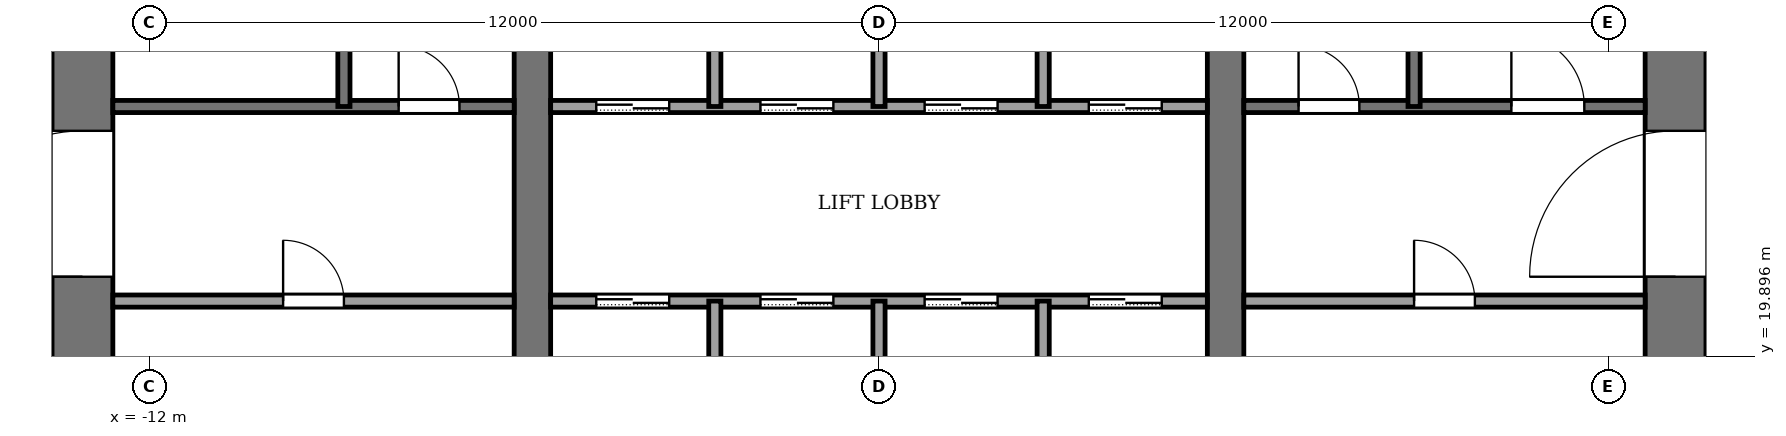
"""IFC4 building model, lengths in metres.
Left out: names, types, materials, properties, quantities, classifications, styles, units other than length and angle.
Written with IfcOpenShell. Run it as: python <this file> out.ifc"""

import sys

from ifc_helpers import new_model, si_unit, direction, frame, frame_2d, origin, place, context, subcontext, project, spatial, rectangle, extrude, element, fill, save


model = new_model("IFC4")
c1 = context("Model", 3, precision=1e-05, world=origin(), true_north=direction((0.0, 1.0)))
c2 = subcontext(c1, "Body", "Model", "MODEL_VIEW")
j1 = project(units=[si_unit("LENGTHUNIT", "METRE"), si_unit("PLANEANGLEUNIT", "RADIAN")], contexts=[c1])
p1 = place(None, origin())
s1 = spatial("IfcSite", under=j1, at=p1, CompositionType="ELEMENT")
p2 = place(p1, origin())
s2 = spatial("IfcBuilding", under=s1, at=p2, CompositionType="ELEMENT")
p3 = place(p2, frame((0.0, 0.0, 158.0)))
s3 = spatial("IfcBuildingStorey", under=s2, at=p3, CompositionType="ELEMENT", Elevation=158.0)
p4 = place(p3, frame((-13.1, 18.4, -0.13), z_axis=(0.0, 0.0, 1.0), x_axis=(0.0, 1.0, 0.0)))
e1 = element("IfcWall", 1, at=p4, inside=s3, PredefinedType="SHEAR", context=c2, shape_type="SweptSolid", body=[
    extrude(rectangle(XDim=19.2, YDim=1.0, at=frame_2d((9.6, 0.0))), origin(), (0.0, 0.0, 1.0), 4.0),
])
p5 = place(p4, frame((2.8, 0.0, 0.13)))
e2 = element("IfcOpeningElement", 2, at=p5, cuts=e1, PredefinedType="OPENING", context=c2, shape_type="SweptSolid", body=[
    extrude(rectangle(XDim=2.4, YDim=2.4, at=frame_2d((1.2, 1.2))), frame((0.0, 0.51, 0.0), z_axis=(0.0, -1.0, 0.0), x_axis=(1.0, 0.0, 0.0)), (0.0, 0.0, 1.0), 1.02),
])
p6 = place(p4, frame((13.4, 0.0, 0.13)))
e3 = element("IfcOpeningElement", 3, at=p6, cuts=e1, PredefinedType="OPENING", context=c2, shape_type="SweptSolid", body=[
    extrude(rectangle(XDim=1.4, YDim=2.2, at=frame_2d((0.7, 1.1))), frame((0.0, 0.51, 0.0), z_axis=(0.0, -1.0, 0.0), x_axis=(1.0, 0.0, 0.0)), (0.0, 0.0, 1.0), 1.02),
])
p7 = place(p3, frame((13.1, 18.4, -0.13), z_axis=(0.0, 0.0, 1.0), x_axis=(0.0, 1.0, 0.0)))
e4 = element("IfcWall", 4, at=p7, inside=s3, PredefinedType="SHEAR", context=c2, shape_type="SweptSolid", body=[
    extrude(rectangle(XDim=19.2, YDim=1.0, at=frame_2d((9.6, 0.0))), origin(), (0.0, 0.0, 1.0), 4.0),
])
p8 = place(p7, frame((2.8, 0.0, 0.13)))
e5 = element("IfcOpeningElement", 5, at=p8, cuts=e4, PredefinedType="OPENING", context=c2, shape_type="SweptSolid", body=[
    extrude(rectangle(XDim=2.4, YDim=2.4, at=frame_2d((1.2, 1.2))), frame((0.0, 0.51, 0.0), z_axis=(0.0, -1.0, 0.0), x_axis=(1.0, 0.0, 0.0)), (0.0, 0.0, 1.0), 1.02),
])
p9 = place(p7, frame((13.3, 0.0, 0.13)))
e6 = element("IfcOpeningElement", 6, at=p9, cuts=e4, PredefinedType="OPENING", context=c2, shape_type="SweptSolid", body=[
    extrude(rectangle(XDim=2.4, YDim=2.4, at=frame_2d((1.2, 1.2))), frame((0.0, 0.51, 0.0), z_axis=(0.0, -1.0, 0.0), x_axis=(1.0, 0.0, 0.0)), (0.0, 0.0, 1.0), 1.02),
])
p10 = place(p3, frame((-5.7, 18.4, -0.13), z_axis=(0.0, 0.0, 1.0), x_axis=(0.0, 1.0, 0.0)))
e7 = element("IfcWall", 7, at=p10, inside=s3, PredefinedType="SHEAR", context=c2, shape_type="SweptSolid", body=[
    extrude(rectangle(XDim=19.2, YDim=0.6, at=frame_2d((9.6, 0.0))), origin(), (0.0, 0.0, 1.0), 4.0),
])
p11 = place(p10, frame((8.35, 0.0, 0.13)))
e8 = element("IfcOpeningElement", 8, at=p11, cuts=e7, PredefinedType="OPENING", context=c2, shape_type="SweptSolid", body=[
    extrude(rectangle(XDim=0.9, YDim=2.1, at=frame_2d((0.45, 1.05))), frame((0.0, 0.31, 0.0), z_axis=(0.0, -1.0, 0.0), x_axis=(1.0, 0.0, 0.0)), (0.0, 0.0, 1.0), 0.62),
])
p12 = place(p3, frame((5.7, 18.4, -0.13), z_axis=(0.0, 0.0, 1.0), x_axis=(0.0, 1.0, 0.0)))
e9 = element("IfcWall", 9, at=p12, inside=s3, PredefinedType="SHEAR", context=c2, shape_type="SweptSolid", body=[
    extrude(rectangle(XDim=19.2, YDim=0.6, at=frame_2d((9.6, 0.0))), origin(), (0.0, 0.0, 1.0), 4.0),
])
p13 = place(p12, frame((13.3, 0.0, 0.13)))
e10 = element("IfcOpeningElement", 10, at=p13, cuts=e9, PredefinedType="OPENING", context=c2, shape_type="SweptSolid", body=[
    extrude(rectangle(XDim=2.4, YDim=2.4, at=frame_2d((1.2, 1.2))), frame((0.0, 0.31, 0.0), z_axis=(0.0, -1.0, 0.0), x_axis=(1.0, 0.0, 0.0)), (0.0, 0.0, 1.0), 0.62),
])
p14 = place(p3, frame((-12.6, 20.8, 0.0), z_axis=(0.0, 0.0, 1.0), x_axis=(1.0, 0.0, 0.0)))
e11 = element("IfcWall", 11, at=p14, inside=s3, PredefinedType="PARTITIONING", context=c2, shape_type="SweptSolid", body=[
    extrude(rectangle(XDim=6.6, YDim=0.2, at=frame_2d((3.3, 0.0))), origin(), (0.0, 0.0, 1.0), 3.87),
])
p15 = place(p14, frame((2.8, 0.0, 0.0)))
e12 = element("IfcOpeningElement", 12, at=p15, cuts=e11, PredefinedType="OPENING", context=c2, shape_type="SweptSolid", body=[
    extrude(rectangle(XDim=1.0, YDim=2.1, at=frame_2d((0.5, 1.05))), frame((0.0, 0.11, 0.0), z_axis=(0.0, -1.0, 0.0), x_axis=(1.0, 0.0, 0.0)), (0.0, 0.0, 1.0), 0.22),
])
p16 = place(p3, frame((-5.4, 20.8, 0.0), z_axis=(0.0, 0.0, 1.0), x_axis=(1.0, 0.0, 0.0)))
e13 = element("IfcWall", 13, at=p16, inside=s3, PredefinedType="PARTITIONING", context=c2, shape_type="SweptSolid", body=[
    extrude(rectangle(XDim=10.8, YDim=0.2, at=frame_2d((5.4, 0.0))), origin(), (0.0, 0.0, 1.0), 3.87),
])
p17 = place(p16, frame((0.75, 0.0, 0.0)))
e14 = element("IfcOpeningElement", 14, at=p17, cuts=e13, PredefinedType="OPENING", context=c2, shape_type="SweptSolid", body=[
    extrude(rectangle(XDim=1.2, YDim=2.2, at=frame_2d((0.6, 1.1))), frame((0.0, 0.11, 0.0), z_axis=(0.0, -1.0, 0.0), x_axis=(1.0, 0.0, 0.0)), (0.0, 0.0, 1.0), 0.22),
])
p18 = place(p16, frame((3.45, 0.0, 0.0)))
e15 = element("IfcOpeningElement", 15, at=p18, cuts=e13, PredefinedType="OPENING", context=c2, shape_type="SweptSolid", body=[
    extrude(rectangle(XDim=1.2, YDim=2.2, at=frame_2d((0.6, 1.1))), frame((0.0, 0.11, 0.0), z_axis=(0.0, -1.0, 0.0), x_axis=(1.0, 0.0, 0.0)), (0.0, 0.0, 1.0), 0.22),
])
p19 = place(p16, frame((6.15, 0.0, 0.0)))
e16 = element("IfcOpeningElement", 16, at=p19, cuts=e13, PredefinedType="OPENING", context=c2, shape_type="SweptSolid", body=[
    extrude(rectangle(XDim=1.2, YDim=2.2, at=frame_2d((0.6, 1.1))), frame((0.0, 0.11, 0.0), z_axis=(0.0, -1.0, 0.0), x_axis=(1.0, 0.0, 0.0)), (0.0, 0.0, 1.0), 0.22),
])
p20 = place(p16, frame((8.85, 0.0, 0.0)))
e17 = element("IfcOpeningElement", 17, at=p20, cuts=e13, PredefinedType="OPENING", context=c2, shape_type="SweptSolid", body=[
    extrude(rectangle(XDim=1.2, YDim=2.2, at=frame_2d((0.6, 1.1))), frame((0.0, 0.11, 0.0), z_axis=(0.0, -1.0, 0.0), x_axis=(1.0, 0.0, 0.0)), (0.0, 0.0, 1.0), 0.22),
])
p21 = place(p3, frame((6.0, 20.8, 0.0), z_axis=(0.0, 0.0, 1.0), x_axis=(1.0, 0.0, 0.0)))
e18 = element("IfcWall", 18, at=p21, inside=s3, PredefinedType="PARTITIONING", context=c2, shape_type="SweptSolid", body=[
    extrude(rectangle(XDim=6.6, YDim=0.2, at=frame_2d((3.3, 0.0))), origin(), (0.0, 0.0, 1.0), 3.87),
])
p22 = place(p21, frame((2.8, 0.0, 0.0)))
e19 = element("IfcOpeningElement", 19, at=p22, cuts=e18, PredefinedType="OPENING", context=c2, shape_type="SweptSolid", body=[
    extrude(rectangle(XDim=1.0, YDim=2.1, at=frame_2d((0.5, 1.05))), frame((0.0, 0.11, 0.0), z_axis=(0.0, -1.0, 0.0), x_axis=(1.0, 0.0, 0.0)), (0.0, 0.0, 1.0), 0.22),
])
p23 = place(p3, frame((-12.6, 24.0, 0.0), z_axis=(0.0, 0.0, 1.0), x_axis=(1.0, 0.0, 0.0)))
e20 = element("IfcWall", 20, at=p23, inside=s3, PredefinedType="PARTITIONING", context=c2, shape_type="SweptSolid", body=[
    extrude(rectangle(XDim=6.6, YDim=0.2, at=frame_2d((3.3, 0.0))), origin(), (0.0, 0.0, 1.0), 3.87),
])
p24 = place(p23, frame((4.7, 0.0, 0.0)))
e21 = element("IfcOpeningElement", 21, at=p24, cuts=e20, PredefinedType="OPENING", context=c2, shape_type="SweptSolid", body=[
    extrude(rectangle(XDim=1.0, YDim=2.1, at=frame_2d((0.5, 1.05))), frame((0.0, 0.11, 0.0), z_axis=(0.0, -1.0, 0.0), x_axis=(1.0, 0.0, 0.0)), (0.0, 0.0, 1.0), 0.22),
])
p25 = place(p3, frame((-5.4, 24.0, 0.0), z_axis=(0.0, 0.0, 1.0), x_axis=(1.0, 0.0, 0.0)))
e22 = element("IfcWall", 22, at=p25, inside=s3, PredefinedType="PARTITIONING", context=c2, shape_type="SweptSolid", body=[
    extrude(rectangle(XDim=10.8, YDim=0.2, at=frame_2d((5.4, 0.0))), origin(), (0.0, 0.0, 1.0), 3.87),
])
p26 = place(p25, frame((0.75, 0.0, 0.0)))
e23 = element("IfcOpeningElement", 23, at=p26, cuts=e22, PredefinedType="OPENING", context=c2, shape_type="SweptSolid", body=[
    extrude(rectangle(XDim=1.2, YDim=2.2, at=frame_2d((0.6, 1.1))), frame((0.0, 0.11, 0.0), z_axis=(0.0, -1.0, 0.0), x_axis=(1.0, 0.0, 0.0)), (0.0, 0.0, 1.0), 0.22),
])
p27 = place(p25, frame((3.45, 0.0, 0.0)))
e24 = element("IfcOpeningElement", 24, at=p27, cuts=e22, PredefinedType="OPENING", context=c2, shape_type="SweptSolid", body=[
    extrude(rectangle(XDim=1.2, YDim=2.2, at=frame_2d((0.6, 1.1))), frame((0.0, 0.11, 0.0), z_axis=(0.0, -1.0, 0.0), x_axis=(1.0, 0.0, 0.0)), (0.0, 0.0, 1.0), 0.22),
])
p28 = place(p25, frame((6.15, 0.0, 0.0)))
e25 = element("IfcOpeningElement", 25, at=p28, cuts=e22, PredefinedType="OPENING", context=c2, shape_type="SweptSolid", body=[
    extrude(rectangle(XDim=1.2, YDim=2.2, at=frame_2d((0.6, 1.1))), frame((0.0, 0.11, 0.0), z_axis=(0.0, -1.0, 0.0), x_axis=(1.0, 0.0, 0.0)), (0.0, 0.0, 1.0), 0.22),
])
p29 = place(p25, frame((8.85, 0.0, 0.0)))
e26 = element("IfcOpeningElement", 26, at=p29, cuts=e22, PredefinedType="OPENING", context=c2, shape_type="SweptSolid", body=[
    extrude(rectangle(XDim=1.2, YDim=2.2, at=frame_2d((0.6, 1.1))), frame((0.0, 0.11, 0.0), z_axis=(0.0, -1.0, 0.0), x_axis=(1.0, 0.0, 0.0)), (0.0, 0.0, 1.0), 0.22),
])
p30 = place(p3, frame((6.0, 24.0, 0.0), z_axis=(0.0, 0.0, 1.0), x_axis=(1.0, 0.0, 0.0)))
e27 = element("IfcWall", 27, at=p30, inside=s3, PredefinedType="PARTITIONING", context=c2, shape_type="SweptSolid", body=[
    extrude(rectangle(XDim=6.6, YDim=0.2, at=frame_2d((3.3, 0.0))), origin(), (0.0, 0.0, 1.0), 3.87),
])
p31 = place(p30, frame((0.9, 0.0, 0.0)))
e28 = element("IfcOpeningElement", 28, at=p31, cuts=e27, PredefinedType="OPENING", context=c2, shape_type="SweptSolid", body=[
    extrude(rectangle(XDim=1.0, YDim=2.1, at=frame_2d((0.5, 1.05))), frame((0.0, 0.11, 0.0), z_axis=(0.0, -1.0, 0.0), x_axis=(1.0, 0.0, 0.0)), (0.0, 0.0, 1.0), 0.22),
])
p32 = place(p30, frame((4.4, 0.0, 0.0)))
e29 = element("IfcOpeningElement", 29, at=p32, cuts=e27, PredefinedType="OPENING", context=c2, shape_type="SweptSolid", body=[
    extrude(rectangle(XDim=1.2, YDim=2.2, at=frame_2d((0.6, 1.1))), frame((0.0, 0.11, 0.0), z_axis=(0.0, -1.0, 0.0), x_axis=(1.0, 0.0, 0.0)), (0.0, 0.0, 1.0), 0.22),
])
p33 = place(p3, frame((-8.8, 24.0, 0.0), z_axis=(0.0, 0.0, 1.0), x_axis=(0.0, 1.0, 0.0)))
e30 = element("IfcWall", 30, at=p33, inside=s3, PredefinedType="PARTITIONING", context=c2, shape_type="SweptSolid", body=[
    extrude(rectangle(XDim=7.4, YDim=0.2, at=frame_2d((3.7, 0.0))), origin(), (0.0, 0.0, 1.0), 3.87),
])
p34 = place(p3, frame((-2.7, 18.4, 0.0), z_axis=(0.0, 0.0, 1.0), x_axis=(0.0, 1.0, 0.0)))
e31 = element("IfcWall", 31, at=p34, inside=s3, PredefinedType="PARTITIONING", context=c2, shape_type="SweptSolid", body=[
    extrude(rectangle(XDim=2.4, YDim=0.2, at=frame_2d((1.2, 0.0))), origin(), (0.0, 0.0, 1.0), 3.87),
])
p35 = place(p3, frame((-2.7, 24.0, 0.0), z_axis=(0.0, 0.0, 1.0), x_axis=(0.0, 1.0, 0.0)))
e32 = element("IfcWall", 32, at=p35, inside=s3, PredefinedType="PARTITIONING", context=c2, shape_type="SweptSolid", body=[
    extrude(rectangle(XDim=2.4, YDim=0.2, at=frame_2d((1.2, 0.0))), origin(), (0.0, 0.0, 1.0), 3.87),
])
p36 = place(p3, frame((0.0, 18.4, 0.0), z_axis=(0.0, 0.0, 1.0), x_axis=(0.0, 1.0, 0.0)))
e33 = element("IfcWall", 33, at=p36, inside=s3, PredefinedType="PARTITIONING", context=c2, shape_type="SweptSolid", body=[
    extrude(rectangle(XDim=2.4, YDim=0.2, at=frame_2d((1.2, 0.0))), origin(), (0.0, 0.0, 1.0), 3.87),
])
p37 = place(p3, frame((0.0, 24.0, 0.0), z_axis=(0.0, 0.0, 1.0), x_axis=(0.0, 1.0, 0.0)))
e34 = element("IfcWall", 34, at=p37, inside=s3, PredefinedType="PARTITIONING", context=c2, shape_type="SweptSolid", body=[
    extrude(rectangle(XDim=2.4, YDim=0.2, at=frame_2d((1.2, 0.0))), origin(), (0.0, 0.0, 1.0), 3.87),
])
p38 = place(p3, frame((2.7, 18.4, 0.0), z_axis=(0.0, 0.0, 1.0), x_axis=(0.0, 1.0, 0.0)))
e35 = element("IfcWall", 35, at=p38, inside=s3, PredefinedType="PARTITIONING", context=c2, shape_type="SweptSolid", body=[
    extrude(rectangle(XDim=2.4, YDim=0.2, at=frame_2d((1.2, 0.0))), origin(), (0.0, 0.0, 1.0), 3.87),
])
p39 = place(p3, frame((2.7, 24.0, 0.0), z_axis=(0.0, 0.0, 1.0), x_axis=(0.0, 1.0, 0.0)))
e36 = element("IfcWall", 36, at=p39, inside=s3, PredefinedType="PARTITIONING", context=c2, shape_type="SweptSolid", body=[
    extrude(rectangle(XDim=2.4, YDim=0.2, at=frame_2d((1.2, 0.0))), origin(), (0.0, 0.0, 1.0), 3.87),
])
p40 = place(p3, frame((8.8, 24.0, 0.0), z_axis=(0.0, 0.0, 1.0), x_axis=(0.0, 1.0, 0.0)))
e37 = element("IfcWall", 37, at=p40, inside=s3, PredefinedType="PARTITIONING", context=c2, shape_type="SweptSolid", body=[
    extrude(rectangle(XDim=7.4, YDim=0.2, at=frame_2d((3.7, 0.0))), origin(), (0.0, 0.0, 1.0), 3.87),
])
p41 = place(p17, origin())
e38 = element("IfcDoor", 38, at=p41, inside=s3, OperationType="SLIDING_TO_LEFT", PredefinedType="DOOR", context=c2, shape_type="SweptSolid", body=[
    extrude(rectangle(XDim=1.2, YDim=2.2, at=frame_2d((0.6, 1.1))), frame((0.0, 0.025, 0.0), z_axis=(0.0, -1.0, 0.0), x_axis=(1.0, 0.0, 0.0)), (0.0, 0.0, 1.0), 0.05),
])
fill(e14, e38)
p42 = place(p18, origin())
e39 = element("IfcDoor", 39, at=p42, inside=s3, OperationType="SLIDING_TO_LEFT", PredefinedType="DOOR", context=c2, shape_type="SweptSolid", body=[
    extrude(rectangle(XDim=1.2, YDim=2.2, at=frame_2d((0.6, 1.1))), frame((0.0, 0.025, 0.0), z_axis=(0.0, -1.0, 0.0), x_axis=(1.0, 0.0, 0.0)), (0.0, 0.0, 1.0), 0.05),
])
fill(e15, e39)
p43 = place(p19, origin())
e40 = element("IfcDoor", 40, at=p43, inside=s3, OperationType="SLIDING_TO_LEFT", PredefinedType="DOOR", context=c2, shape_type="SweptSolid", body=[
    extrude(rectangle(XDim=1.2, YDim=2.2, at=frame_2d((0.6, 1.1))), frame((0.0, 0.025, 0.0), z_axis=(0.0, -1.0, 0.0), x_axis=(1.0, 0.0, 0.0)), (0.0, 0.0, 1.0), 0.05),
])
fill(e16, e40)
p44 = place(p20, origin())
e41 = element("IfcDoor", 41, at=p44, inside=s3, OperationType="SLIDING_TO_LEFT", PredefinedType="DOOR", context=c2, shape_type="SweptSolid", body=[
    extrude(rectangle(XDim=1.2, YDim=2.2, at=frame_2d((0.6, 1.1))), frame((0.0, 0.025, 0.0), z_axis=(0.0, -1.0, 0.0), x_axis=(1.0, 0.0, 0.0)), (0.0, 0.0, 1.0), 0.05),
])
fill(e17, e41)
p45 = place(p26, origin())
e42 = element("IfcDoor", 42, at=p45, inside=s3, OperationType="SLIDING_TO_LEFT", PredefinedType="DOOR", context=c2, shape_type="SweptSolid", body=[
    extrude(rectangle(XDim=1.2, YDim=2.2, at=frame_2d((0.6, 1.1))), frame((0.0, 0.025, 0.0), z_axis=(0.0, -1.0, 0.0), x_axis=(1.0, 0.0, 0.0)), (0.0, 0.0, 1.0), 0.05),
])
fill(e23, e42)
p46 = place(p27, origin())
e43 = element("IfcDoor", 43, at=p46, inside=s3, OperationType="SLIDING_TO_LEFT", PredefinedType="DOOR", context=c2, shape_type="SweptSolid", body=[
    extrude(rectangle(XDim=1.2, YDim=2.2, at=frame_2d((0.6, 1.1))), frame((0.0, 0.025, 0.0), z_axis=(0.0, -1.0, 0.0), x_axis=(1.0, 0.0, 0.0)), (0.0, 0.0, 1.0), 0.05),
])
fill(e24, e43)
p47 = place(p28, origin())
e44 = element("IfcDoor", 44, at=p47, inside=s3, OperationType="SLIDING_TO_LEFT", PredefinedType="DOOR", context=c2, shape_type="SweptSolid", body=[
    extrude(rectangle(XDim=1.2, YDim=2.2, at=frame_2d((0.6, 1.1))), frame((0.0, 0.025, 0.0), z_axis=(0.0, -1.0, 0.0), x_axis=(1.0, 0.0, 0.0)), (0.0, 0.0, 1.0), 0.05),
])
fill(e25, e44)
p48 = place(p29, origin())
e45 = element("IfcDoor", 45, at=p48, inside=s3, OperationType="SLIDING_TO_LEFT", PredefinedType="DOOR", context=c2, shape_type="SweptSolid", body=[
    extrude(rectangle(XDim=1.2, YDim=2.2, at=frame_2d((0.6, 1.1))), frame((0.0, 0.025, 0.0), z_axis=(0.0, -1.0, 0.0), x_axis=(1.0, 0.0, 0.0)), (0.0, 0.0, 1.0), 0.05),
])
fill(e26, e45)
p49 = place(p15, origin())
e46 = element("IfcDoor", 46, at=p49, inside=s3, OperationType="SINGLE_SWING_LEFT", PredefinedType="DOOR", context=c2, shape_type="SweptSolid", body=[
    extrude(rectangle(XDim=1.0, YDim=2.1, at=frame_2d((0.5, 1.05))), frame((0.0, 0.025, 0.0), z_axis=(0.0, -1.0, 0.0), x_axis=(1.0, 0.0, 0.0)), (0.0, 0.0, 1.0), 0.05),
])
fill(e12, e46)
p50 = place(p22, origin())
e47 = element("IfcDoor", 47, at=p50, inside=s3, OperationType="SINGLE_SWING_RIGHT", PredefinedType="DOOR", context=c2, shape_type="SweptSolid", body=[
    extrude(rectangle(XDim=1.0, YDim=2.1, at=frame_2d((0.5, 1.05))), frame((0.0, 0.025, 0.0), z_axis=(0.0, -1.0, 0.0), x_axis=(1.0, 0.0, 0.0)), (0.0, 0.0, 1.0), 0.05),
])
fill(e19, e47)
p51 = place(p24, origin())
e48 = element("IfcDoor", 48, at=p51, inside=s3, OperationType="SINGLE_SWING_RIGHT", PredefinedType="DOOR", context=c2, shape_type="SweptSolid", body=[
    extrude(rectangle(XDim=1.0, YDim=2.1, at=frame_2d((0.5, 1.05))), frame((0.0, 0.025, 0.0), z_axis=(0.0, -1.0, 0.0), x_axis=(1.0, 0.0, 0.0)), (0.0, 0.0, 1.0), 0.05),
])
fill(e21, e48)
p52 = place(p31, origin())
e49 = element("IfcDoor", 49, at=p52, inside=s3, OperationType="SINGLE_SWING_LEFT", PredefinedType="DOOR", context=c2, shape_type="SweptSolid", body=[
    extrude(rectangle(XDim=1.0, YDim=2.1, at=frame_2d((0.5, 1.05))), frame((0.0, 0.025, 0.0), z_axis=(0.0, -1.0, 0.0), x_axis=(1.0, 0.0, 0.0)), (0.0, 0.0, 1.0), 0.05),
])
fill(e28, e49)
p53 = place(p32, origin())
e50 = element("IfcDoor", 50, at=p53, inside=s3, OperationType="SINGLE_SWING_LEFT", PredefinedType="DOOR", context=c2, shape_type="SweptSolid", body=[
    extrude(rectangle(XDim=1.2, YDim=2.2, at=frame_2d((0.6, 1.1))), frame((0.0, 0.025, 0.0), z_axis=(0.0, -1.0, 0.0), x_axis=(1.0, 0.0, 0.0)), (0.0, 0.0, 1.0), 0.05),
])
fill(e29, e50)
p54 = place(p5, origin())
e51 = element("IfcDoor", 51, at=p54, inside=s3, OperationType="DOUBLE_DOOR_SINGLE_SWING", PredefinedType="DOOR", context=c2, shape_type="SweptSolid", body=[
    extrude(rectangle(XDim=2.4, YDim=2.4, at=frame_2d((1.2, 1.2))), frame((0.0, 0.025, 0.0), z_axis=(0.0, -1.0, 0.0), x_axis=(1.0, 0.0, 0.0)), (0.0, 0.0, 1.0), 0.05),
])
fill(e2, e51)
p55 = place(p8, origin())
e52 = element("IfcDoor", 52, at=p55, inside=s3, OperationType="DOUBLE_DOOR_SINGLE_SWING", PredefinedType="DOOR", context=c2, shape_type="SweptSolid", body=[
    extrude(rectangle(XDim=2.4, YDim=2.4, at=frame_2d((1.2, 1.2))), frame((0.0, 0.025, 0.0), z_axis=(0.0, -1.0, 0.0), x_axis=(1.0, 0.0, 0.0)), (0.0, 0.0, 1.0), 0.05),
])
fill(e5, e52)
save(model, sys.argv[1])
